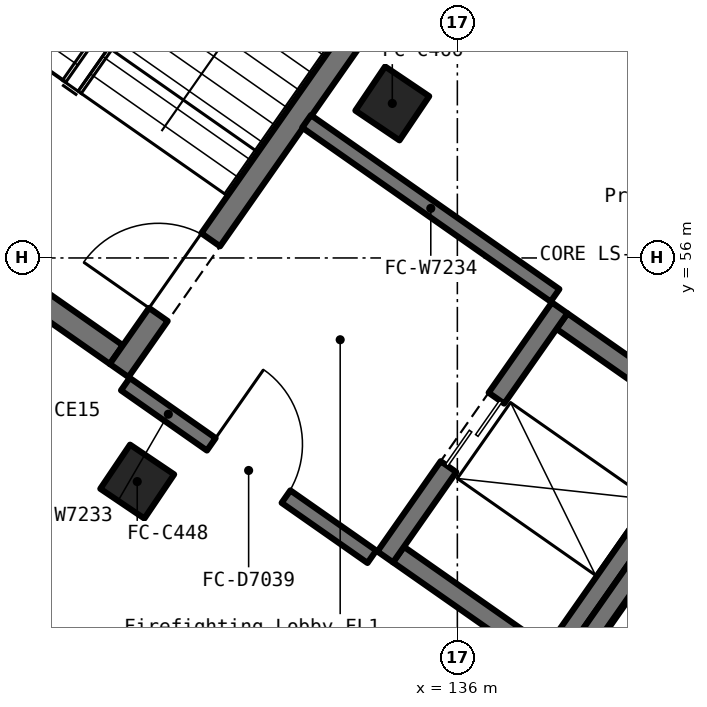
"""IFC4 building model, lengths in metres.
Left out: names, types, materials, properties, quantities, classifications, styles, units other than length and angle.
Written with IfcOpenShell. Run it as: python <this file> out.ifc"""

import sys

from ifc_helpers import new_model, si_unit, direction, frame, frame_2d, origin, origin_2d, place, context, subcontext, project, spatial, rectangle, extrude, element, fill, save


model = new_model("IFC4")
c1 = context("Model", 3, precision=1e-05, world=origin(), true_north=direction((0.0, 1.0)))
c2 = subcontext(c1, "Body", "Model", "MODEL_VIEW")
j1 = project(units=[si_unit("LENGTHUNIT", "METRE"), si_unit("PLANEANGLEUNIT", "RADIAN")], contexts=[c1])
p1 = place(None, origin())
s1 = spatial("IfcSite", under=j1, at=p1, CompositionType="ELEMENT")
p2 = place(p1, origin())
s2 = spatial("IfcBuilding", under=s1, at=p2, CompositionType="ELEMENT")
p3 = place(p2, frame((0.0, 0.0, 6.0)))
s3 = spatial("IfcBuildingStorey", under=s2, at=p3, CompositionType="ELEMENT", Elevation=6.0)
for number, where, z_axis, x_axis in (
    (1, (131.788, 53.058, 0.0), (0.0, 0.0, 1.0), (0.829, -0.559, 0.0)),
    (2, (135.144, 58.033, 0.0), (0.0, 0.0, 1.0), (0.829, -0.559, 0.0)),
):
    element("IfcColumn", number, at=place(p3, frame(where, z_axis=z_axis, x_axis=x_axis)), inside=s3, PredefinedType="COLUMN", context=c2, shape_type="SweptSolid", body=[
        extrude(rectangle(XDim=0.7, YDim=0.7, at=origin_2d()), origin(), (0.0, 0.0, 1.0), 5.5),
    ])
p4 = place(p3, frame((127.418, 57.596, 0.0), z_axis=(0.0, 0.0, 1.0), x_axis=(0.819096538389, -0.573655698829, 0.0)))
e3 = element("IfcWall", 3, at=p4, inside=s3, PredefinedType="SOLIDWALL", context=c2, shape_type="SweptSolid", body=[
    extrude(rectangle(XDim=4.999, YDim=0.3, at=frame_2d((2.5, 0.0))), origin(), (0.0, 0.0, 1.0), 5.5),
])
p5 = place(p3, frame((131.55, 54.519, 0.0), z_axis=(0.0, 0.0, 1.0), x_axis=(0.573563925118, 0.819160804606, 0.0)))
e4 = element("IfcWall", 4, at=p5, inside=s3, PredefinedType="SOLIDWALL", context=c2, shape_type="SweptSolid", body=[
    extrude(rectangle(XDim=10.0, YDim=0.3, at=frame_2d((5.0, 0.0))), origin(), (0.0, 0.0, 1.0), 5.5),
])
p6 = place(p5, frame((0.9, 0.0, 0.0)))
e5 = element("IfcOpeningElement", 5, at=p6, cuts=e4, PredefinedType="OPENING", context=c2, shape_type="SweptSolid", body=[
    extrude(rectangle(XDim=1.2, YDim=2.1, at=frame_2d((0.6, 1.05))), frame((0.0, 0.162, 0.0), z_axis=(0.0, -1.0, 0.0), x_axis=(1.0, 0.0, 0.0)), (0.0, 0.0, 1.0), 0.324),
])
p7 = place(p3, frame((132.944, 65.751, 0.0), z_axis=(0.0, 0.0, 1.0), x_axis=(-0.573514776444, -0.819195215563, 0.0)))
e6 = element("IfcWall", 6, at=p7, inside=s3, PredefinedType="SOLIDWALL", context=c2, shape_type="SweptSolid", body=[
    extrude(rectangle(XDim=10.0, YDim=0.3, at=frame_2d((5.0, 0.0))), origin(), (0.0, 0.0, 1.0), 5.5),
])
p8 = place(p3, frame((135.225, 52.098, 0.0), z_axis=(0.0, 0.0, 1.0), x_axis=(0.819366508838, -0.573270027295, 0.0)))
e7 = element("IfcWall", 7, at=p8, inside=s3, PredefinedType="SOLIDWALL", context=c2, shape_type="SweptSolid", body=[
    extrude(rectangle(XDim=2.301, YDim=0.25, at=frame_2d((1.15, 0.0))), origin(), (0.0, 0.0, 1.0), 5.5),
])
p9 = place(p3, frame((137.141, 50.605, 0.0), z_axis=(0.0, 0.0, 1.0), x_axis=(0.573572956461, 0.819154480923, 0.0)))
e8 = element("IfcWall", 8, at=p9, inside=s3, PredefinedType="SOLIDWALL", context=c2, shape_type="SweptSolid", body=[
    extrude(rectangle(XDim=4.0, YDim=0.25, at=frame_2d((2.0, 0.0))), origin(), (0.0, 0.0, 1.0), 5.5),
])
p10 = place(p3, frame((139.261, 53.85, 0.0), z_axis=(0.0, 0.0, 1.0), x_axis=(-0.819226933165, 0.573469469089, 0.0)))
e9 = element("IfcWall", 9, at=p10, inside=s3, PredefinedType="SOLIDWALL", context=c2, shape_type="SweptSolid", body=[
    extrude(rectangle(XDim=2.3, YDim=0.25, at=frame_2d((1.15, 0.0))), origin(), (0.0, 0.0, 1.0), 5.5),
])
p11 = place(p3, frame((137.346, 55.343, 0.0), z_axis=(0.0, 0.0, 1.0), x_axis=(-0.573736768582, -0.819039755065, 0.0)))
e10 = element("IfcWall", 10, at=p11, inside=s3, PredefinedType="SOLIDWALL", context=c2, shape_type="SweptSolid", body=[
    extrude(rectangle(XDim=4.0, YDim=0.25, at=frame_2d((2.0, 0.0))), origin(), (0.0, 0.0, 1.0), 5.5),
])
p12 = place(p11, frame((1.45, 0.0, 0.0)))
e11 = element("IfcOpeningElement", 11, at=p12, cuts=e10, PredefinedType="OPENING", context=c2, shape_type="SweptSolid", body=[
    extrude(rectangle(XDim=1.1, YDim=2.1, at=frame_2d((0.55, 1.05))), frame((0.0, 0.137, 0.0), z_axis=(0.0, -1.0, 0.0), x_axis=(1.0, 0.0, 0.0)), (0.0, 0.0, 1.0), 0.274),
])
p13 = place(p3, frame((139.639, 53.737, 0.0), z_axis=(0.0, 0.0, 1.0), x_axis=(-0.573572956461, -0.819154480923, 0.0)))
e12 = element("IfcWall", 12, at=p13, inside=s3, PredefinedType="SOLIDWALL", context=c2, shape_type="SweptSolid", body=[
    extrude(rectangle(XDim=4.0, YDim=0.25, at=frame_2d((2.0, 0.0))), origin(), (0.0, 0.0, 1.0), 5.5),
])
p14 = place(p3, frame((131.632, 54.34, 0.0), z_axis=(0.0, 0.0, 1.0), x_axis=(0.81911891796, -0.573623742744, 0.0)))
e13 = element("IfcWall", 13, at=p14, inside=s3, PredefinedType="PARTITIONING", context=c2, shape_type="SweptSolid", body=[
    extrude(rectangle(XDim=3.959, YDim=0.2, at=frame_2d((1.979, 0.0))), origin(), (0.0, 0.0, 1.0), 5.28),
])
p15 = place(p14, frame((1.38, 0.0, 0.0)))
e14 = element("IfcOpeningElement", 14, at=p15, cuts=e13, PredefinedType="OPENING", context=c2, shape_type="SweptSolid", body=[
    extrude(rectangle(XDim=1.2, YDim=2.1, at=frame_2d((0.6, 1.05))), frame((0.0, 0.112, 0.0), z_axis=(0.0, -1.0, 0.0), x_axis=(1.0, 0.0, 0.0)), (0.0, 0.0, 1.0), 0.224),
])
p16 = place(p3, frame((137.285, 55.508, 0.0), z_axis=(0.0, 0.0, 1.0), x_axis=(-0.819125561737, 0.573614255497, 0.0)))
e15 = element("IfcWall", 15, at=p16, inside=s3, PredefinedType="PARTITIONING", context=c2, shape_type="SweptSolid", body=[
    extrude(rectangle(XDim=3.99, YDim=0.2, at=frame_2d((1.995, 0.0))), origin(), (0.0, 0.0, 1.0), 5.28),
])
p17 = place(p6, origin())
e16 = element("IfcDoor", 16, at=p17, inside=s3, OperationType="SINGLE_SWING_LEFT", PredefinedType="DOOR", context=c2, shape_type="SweptSolid", body=[
    extrude(rectangle(XDim=1.2, YDim=2.1, at=frame_2d((0.6, 1.05))), frame((0.0, 0.025, 0.0), z_axis=(0.0, -1.0, 0.0), x_axis=(1.0, 0.0, 0.0)), (0.0, 0.0, 1.0), 0.05),
])
fill(e5, e16)
p18 = place(p12, origin())
e17 = element("IfcDoor", 17, at=p18, inside=s3, OperationType="DOUBLE_DOOR_SLIDING", PredefinedType="DOOR", context=c2, shape_type="SweptSolid", body=[
    extrude(rectangle(XDim=1.1, YDim=2.1, at=frame_2d((0.55, 1.05))), frame((0.0, 0.025, 0.0), z_axis=(0.0, -1.0, 0.0), x_axis=(1.0, 0.0, 0.0)), (0.0, 0.0, 1.0), 0.05),
])
fill(e11, e17)
p19 = place(p15, origin())
e18 = element("IfcDoor", 18, at=p19, inside=s3, OperationType="SINGLE_SWING_LEFT", PredefinedType="DOOR", context=c2, shape_type="SweptSolid", body=[
    extrude(rectangle(XDim=1.2, YDim=2.1, at=frame_2d((0.6, 1.05))), frame((0.0, 0.025, 0.0), z_axis=(0.0, -1.0, 0.0), x_axis=(1.0, 0.0, 0.0)), (0.0, 0.0, 1.0), 0.05),
])
fill(e14, e18)
save(model, sys.argv[1])
